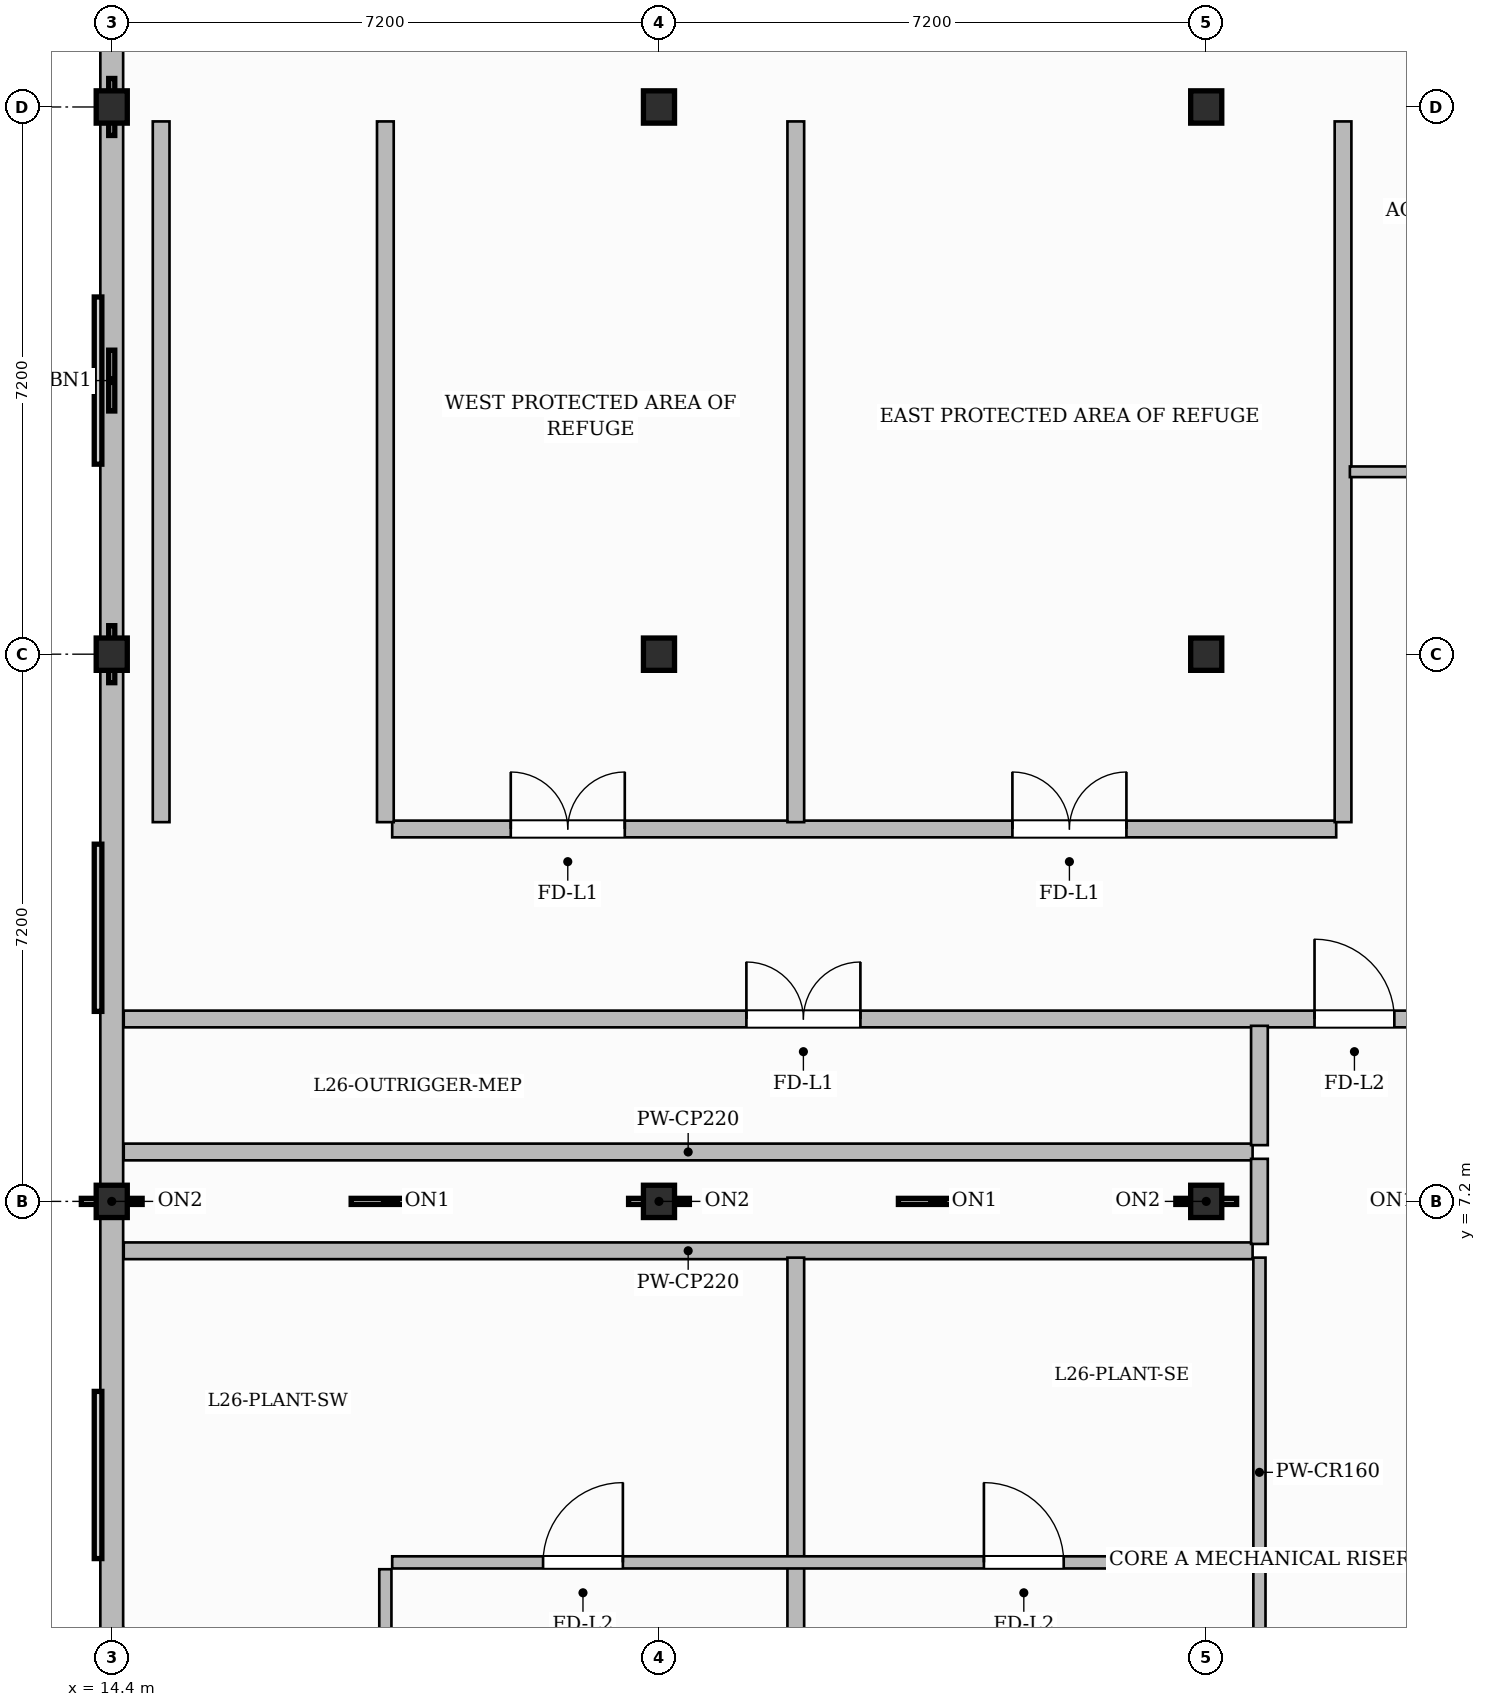
"""IFC4 building model, lengths in metres.
Left out: names, types, materials, properties, quantities, classifications, styles, units other than length and angle.
Written with IfcOpenShell. Run it as: python <this file> out.ifc"""

import sys

from ifc_helpers import new_model, si_unit, direction, frame, frame_2d, origin, origin_2d, place, context, subcontext, project, spatial, rectangle, i_section, extrude, source, transform, mapped, element, fill, save


model = new_model("IFC4")
c1 = context("Model", 3, precision=1e-05, world=origin(), true_north=direction((0.0, 1.0)))
c2 = subcontext(c1, "Body", "Model", "MODEL_VIEW")
j1 = project(units=[si_unit("LENGTHUNIT", "METRE"), si_unit("PLANEANGLEUNIT", "RADIAN")], contexts=[c1])
p1 = place(None, origin())
s1 = spatial("IfcSite", under=j1, at=p1, CompositionType="ELEMENT")
p2 = place(p1, origin())
s2 = spatial("IfcBuilding", under=s1, at=p2, CompositionType="ELEMENT")
p3 = place(p2, frame((0.0, 0.0, 106.4)))
s3 = spatial("IfcBuildingStorey", under=s2, at=p3, CompositionType="ELEMENT", Elevation=106.4)
m1 = source(origin(), c2, "Body", "SweptSolid", [
    extrude(i_section(OverallWidth=0.409, OverallDepth=0.425, WebThickness=0.024, FlangeThickness=0.039, FilletRadius=0.015, at=origin_2d()), origin(), (0.0, 0.0, 1.0), 5.4),
])
for number, where, z_axis, x_axis in (
    (1, (14.4, 7.2, 0.0), (0.0, 0.0, 1.0), (1.0, 0.0, 0.0)),
    (2, (14.4, 14.4, 0.0), (0.0, 0.0, 1.0), (1.0, 0.0, 0.0)),
    (3, (14.4, 21.6, 0.0), (0.0, 0.0, 1.0), (1.0, 0.0, 0.0)),
    (4, (21.6, 7.2, 0.0), (0.0, 0.0, 1.0), (1.0, 0.0, 0.0)),
    (5, (21.6, 14.4, 0.0), (0.0, 0.0, 1.0), (1.0, 0.0, 0.0)),
    (6, (21.6, 21.6, 0.0), (0.0, 0.0, 1.0), (1.0, 0.0, 0.0)),
    (7, (28.8, 7.2, 0.0), (0.0, 0.0, 1.0), (1.0, 0.0, 0.0)),
    (8, (28.8, 14.4, 0.0), (0.0, 0.0, 1.0), (1.0, 0.0, 0.0)),
    (9, (28.8, 21.6, 0.0), (0.0, 0.0, 1.0), (1.0, 0.0, 0.0)),
):
    element("IfcColumn", number, at=place(p3, frame(where, z_axis=z_axis, x_axis=x_axis)), inside=s3, PredefinedType="COLUMN", context=c2, shape_type="MappedRepresentation", body=[
        mapped(m1, transform((0.0, 0.0, 0.0), scale=1.0)),
    ])
for number, where, z_axis, x_axis in (
    (10, (14.558, 6.55, 0.0), (0.0, 0.0, 1.0), (1.0, 0.0, 0.0)),
    (11, (14.558, 7.85, 0.0), (0.0, 0.0, 1.0), (1.0, 0.0, 0.0)),
):
    element("IfcWall", number, at=place(p3, frame(where, z_axis=z_axis, x_axis=x_axis)), inside=s3, PredefinedType="PARTITIONING", context=c2, shape_type="SweptSolid", body=[
        extrude(rectangle(XDim=14.852, YDim=0.22, at=frame_2d((7.426, 0.0))), origin(), (0.0, 0.0, 1.0), 5.15),
    ])
p4 = place(p3, frame((29.5, 6.64, 0.0), z_axis=(0.0, 0.0, 1.0), x_axis=(0.0, 1.0, 0.0)))
e12 = element("IfcWall", 12, at=p4, inside=s3, PredefinedType="PARTITIONING", context=c2, shape_type="SweptSolid", body=[
    extrude(rectangle(XDim=1.12, YDim=0.22, at=frame_2d((0.56, 0.0))), origin(), (0.0, 0.0, 1.0), 5.15),
])
p5 = place(p3, frame((15.05, 12.19, 0.0), z_axis=(0.0, 0.0, 1.0), x_axis=(0.0, 1.0, 0.0)))
e13 = element("IfcWall", 13, at=p5, inside=s3, PredefinedType="PARTITIONING", context=c2, shape_type="SweptSolid", body=[
    extrude(rectangle(XDim=9.22, YDim=0.22, at=frame_2d((4.61, 0.0))), origin(), (0.0, 0.0, 1.0), 5.15),
])
p6 = place(p3, frame((14.558, 9.6, 0.0), z_axis=(0.0, 0.0, 1.0), x_axis=(1.0, 0.0, 0.0)))
e14 = element("IfcWall", 14, at=p6, inside=s3, PredefinedType="PARTITIONING", context=c2, shape_type="SweptSolid", body=[
    extrude(rectangle(XDim=17.372, YDim=0.22, at=frame_2d((8.686, 0.0))), origin(), (0.0, 0.0, 1.0), 5.15),
])
p7 = place(p6, frame((15.667, 0.0, 0.0)))
e15 = element("IfcOpeningElement", 15, at=p7, cuts=e14, PredefinedType="OPENING", context=c2, shape_type="SweptSolid", body=[
    extrude(rectangle(XDim=1.05, YDim=2.15, at=frame_2d((0.525, 1.075))), frame((0.0, 0.12, 0.0), z_axis=(0.0, -1.0, 0.0), x_axis=(1.0, 0.0, 0.0)), (0.0, 0.0, 1.0), 0.24),
])
p8 = place(p6, frame((8.192, 0.0, 0.0)))
e16 = element("IfcOpeningElement", 16, at=p8, cuts=e14, PredefinedType="OPENING", context=c2, shape_type="SweptSolid", body=[
    extrude(rectangle(XDim=1.5, YDim=2.2, at=frame_2d((0.75, 1.1))), frame((0.0, 0.12, 0.0), z_axis=(0.0, -1.0, 0.0), x_axis=(1.0, 0.0, 0.0)), (0.0, 0.0, 1.0), 0.24),
])
p9 = place(p3, frame((18.09, 12.1, 0.0), z_axis=(0.0, 0.0, 1.0), x_axis=(1.0, 0.0, 0.0)))
e17 = element("IfcWall", 17, at=p9, inside=s3, PredefinedType="PARTITIONING", context=c2, shape_type="SweptSolid", body=[
    extrude(rectangle(XDim=12.42, YDim=0.22, at=frame_2d((6.21, 0.0))), origin(), (0.0, 0.0, 1.0), 5.15),
])
p10 = place(p9, frame((1.56, 0.0, 0.0)))
e18 = element("IfcOpeningElement", 18, at=p10, cuts=e17, PredefinedType="OPENING", context=c2, shape_type="SweptSolid", body=[
    extrude(rectangle(XDim=1.5, YDim=2.2, at=frame_2d((0.75, 1.1))), frame((0.0, 0.12, 0.0), z_axis=(0.0, -1.0, 0.0), x_axis=(1.0, 0.0, 0.0)), (0.0, 0.0, 1.0), 0.24),
])
p11 = place(p9, frame((8.16, 0.0, 0.0)))
e19 = element("IfcOpeningElement", 19, at=p11, cuts=e17, PredefinedType="OPENING", context=c2, shape_type="SweptSolid", body=[
    extrude(rectangle(XDim=1.5, YDim=2.2, at=frame_2d((0.75, 1.1))), frame((0.0, 0.12, 0.0), z_axis=(0.0, -1.0, 0.0), x_axis=(1.0, 0.0, 0.0)), (0.0, 0.0, 1.0), 0.24),
])
p12 = place(p3, frame((23.4, 0.81, 0.0), z_axis=(0.0, 0.0, 1.0), x_axis=(0.0, 1.0, 0.0)))
e20 = element("IfcWall", 20, at=p12, inside=s3, PredefinedType="PARTITIONING", context=c2, shape_type="SweptSolid", body=[
    extrude(rectangle(XDim=5.65, YDim=0.22, at=frame_2d((2.825, 0.0))), origin(), (0.0, 0.0, 1.0), 5.15),
])
p13 = place(p3, frame((29.5, 0.81, 0.0), z_axis=(0.0, 0.0, 1.0), x_axis=(0.0, 1.0, 0.0)))
e21 = element("IfcWall", 21, at=p13, inside=s3, PredefinedType="PARTITIONING", context=c2, shape_type="SweptSolid", body=[
    extrude(rectangle(XDim=5.65, YDim=0.16, at=frame_2d((2.825, 0.0))), origin(), (0.0, 0.0, 1.0), 5.15),
])
p14 = place(p3, frame((29.5, 7.94, 0.0), z_axis=(0.0, 0.0, 1.0), x_axis=(0.0, 1.0, 0.0)))
e22 = element("IfcWall", 22, at=p14, inside=s3, PredefinedType="PARTITIONING", context=c2, shape_type="SweptSolid", body=[
    extrude(rectangle(XDim=1.57, YDim=0.22, at=frame_2d((0.785, 0.0))), origin(), (0.0, 0.0, 1.0), 5.15),
])
p15 = place(p3, frame((18.09, 2.45, 0.0), z_axis=(0.0, 0.0, 1.0), x_axis=(1.0, 0.0, 0.0)))
e23 = element("IfcWall", 23, at=p15, inside=s3, PredefinedType="PARTITIONING", context=c2, shape_type="SweptSolid", body=[
    extrude(rectangle(XDim=11.32, YDim=0.16, at=frame_2d((5.66, 0.0))), origin(), (0.0, 0.0, 1.0), 5.15),
])
p16 = place(p15, frame((1.985, 0.0, 0.0)))
e24 = element("IfcOpeningElement", 24, at=p16, cuts=e23, PredefinedType="OPENING", context=c2, shape_type="SweptSolid", body=[
    extrude(rectangle(XDim=1.05, YDim=2.15, at=frame_2d((0.525, 1.075))), frame((0.0, 0.09, 0.0), z_axis=(0.0, -1.0, 0.0), x_axis=(1.0, 0.0, 0.0)), (0.0, 0.0, 1.0), 0.18),
])
p17 = place(p15, frame((7.785, 0.0, 0.0)))
e25 = element("IfcOpeningElement", 25, at=p17, cuts=e23, PredefinedType="OPENING", context=c2, shape_type="SweptSolid", body=[
    extrude(rectangle(XDim=1.05, YDim=2.15, at=frame_2d((0.525, 1.075))), frame((0.0, 0.09, 0.0), z_axis=(0.0, -1.0, 0.0), x_axis=(1.0, 0.0, 0.0)), (0.0, 0.0, 1.0), 0.18),
])
p18 = place(p3, frame((18.0, 0.81, 0.0), z_axis=(0.0, 0.0, 1.0), x_axis=(0.0, 1.0, 0.0)))
e26 = element("IfcWall", 26, at=p18, inside=s3, PredefinedType="PARTITIONING", context=c2, shape_type="SweptSolid", body=[
    extrude(rectangle(XDim=1.55, YDim=0.16, at=frame_2d((0.775, 0.0))), origin(), (0.0, 0.0, 1.0), 4.685),
])
p19 = place(p3, frame((18.0, 12.19, 0.0), z_axis=(0.0, 0.0, 1.0), x_axis=(0.0, 1.0, 0.0)))
e27 = element("IfcWall", 27, at=p19, inside=s3, PredefinedType="PARTITIONING", context=c2, shape_type="SweptSolid", body=[
    extrude(rectangle(XDim=9.22, YDim=0.22, at=frame_2d((4.61, 0.0))), origin(), (0.0, 0.0, 1.0), 4.685),
])
for number, where, z_axis, x_axis in (
    (28, (23.4, 12.19, 0.0), (0.0, 0.0, 1.0), (0.0, 1.0, 0.0)),
    (29, (30.6, 12.19, 0.0), (0.0, 0.0, 1.0), (0.0, 1.0, 0.0)),
):
    element("IfcWall", number, at=place(p3, frame(where, z_axis=z_axis, x_axis=x_axis)), inside=s3, PredefinedType="PARTITIONING", context=c2, shape_type="SweptSolid", body=[
        extrude(rectangle(XDim=9.22, YDim=0.22, at=frame_2d((4.61, 0.0))), origin(), (0.0, 0.0, 1.0), 5.15),
    ])
p20 = place(p3, frame((30.69, 16.8, 0.0), z_axis=(0.0, 0.0, 1.0), x_axis=(1.0, 0.0, 0.0)))
e30 = element("IfcWall", 30, at=p20, inside=s3, PredefinedType="PARTITIONING", context=c2, shape_type="SweptSolid", body=[
    extrude(rectangle(XDim=3.92, YDim=0.14, at=frame_2d((1.96, 0.0))), origin(), (0.0, 0.0, 1.0), 5.15),
])
p21 = place(p20, frame((1.535, 0.0, 0.0)))
e31 = element("IfcOpeningElement", 31, at=p21, cuts=e30, PredefinedType="OPENING", context=c2, shape_type="SweptSolid", body=[
    extrude(rectangle(XDim=0.85, YDim=2.1, at=frame_2d((0.425, 1.05))), frame((0.0, 0.08, 0.0), z_axis=(0.0, -1.0, 0.0), x_axis=(1.0, 0.0, 0.0)), (0.0, 0.0, 1.0), 0.16),
])
p22 = place(p3, frame((14.4, 0.05, 0.0), z_axis=(0.0, 0.0, 1.0), x_axis=(0.0, 1.0, 0.0)))
e32 = element("IfcWall", 32, at=p22, inside=s3, PredefinedType="SOLIDWALL", context=c2, shape_type="SweptSolid", body=[
    extrude(rectangle(XDim=25.1, YDim=0.3, at=frame_2d((12.55, 0.0))), origin(), (0.0, 0.0, 1.0), 4.485),
])
m2 = source(origin(), c2, "Body", "SweptSolid", [
    extrude(rectangle(XDim=1.05, YDim=2.15, at=frame_2d((0.525, 1.075))), frame((0.0, 0.025, 0.0), z_axis=(0.0, -1.0, 0.0), x_axis=(1.0, 0.0, 0.0)), (0.0, 0.0, 1.0), 0.05),
])
p23 = place(p7, origin())
e33 = element("IfcDoor", 33, at=p23, inside=s3, OperationType="SINGLE_SWING_LEFT", PredefinedType="DOOR", context=c2, shape_type="MappedRepresentation", body=[
    mapped(m2, transform((0.0, 0.0, 0.0), scale=1.0)),
])
fill(e15, e33)
m3 = source(origin(), c2, "Body", "SweptSolid", [
    extrude(rectangle(XDim=1.5, YDim=2.2, at=frame_2d((0.75, 1.1))), frame((0.0, 0.025, 0.0), z_axis=(0.0, -1.0, 0.0), x_axis=(1.0, 0.0, 0.0)), (0.0, 0.0, 1.0), 0.05),
])
p24 = place(p8, origin())
e34 = element("IfcDoor", 34, at=p24, inside=s3, OperationType="DOUBLE_DOOR_SINGLE_SWING", PredefinedType="DOOR", context=c2, shape_type="MappedRepresentation", body=[
    mapped(m3, transform((0.0, 0.0, 0.0), scale=1.0)),
])
fill(e16, e34)
p25 = place(p16, origin())
e35 = element("IfcDoor", 35, at=p25, inside=s3, OperationType="SINGLE_SWING_RIGHT", PredefinedType="DOOR", context=c2, shape_type="MappedRepresentation", body=[
    mapped(m2, transform((0.0, 0.0, 0.0), scale=1.0)),
])
fill(e24, e35)
p26 = place(p17, origin())
e36 = element("IfcDoor", 36, at=p26, inside=s3, OperationType="SINGLE_SWING_LEFT", PredefinedType="DOOR", context=c2, shape_type="MappedRepresentation", body=[
    mapped(m2, transform((0.0, 0.0, 0.0), scale=1.0)),
])
fill(e25, e36)
p27 = place(p10, origin())
e37 = element("IfcDoor", 37, at=p27, inside=s3, OperationType="DOUBLE_DOOR_SINGLE_SWING", PredefinedType="DOOR", context=c2, shape_type="MappedRepresentation", body=[
    mapped(m3, transform((0.0, 0.0, 0.0), scale=1.0)),
])
fill(e18, e37)
p28 = place(p11, origin())
e38 = element("IfcDoor", 38, at=p28, inside=s3, OperationType="DOUBLE_DOOR_SINGLE_SWING", PredefinedType="DOOR", context=c2, shape_type="MappedRepresentation", body=[
    mapped(m3, transform((0.0, 0.0, 0.0), scale=1.0)),
])
fill(e19, e38)
save(model, sys.argv[1])
